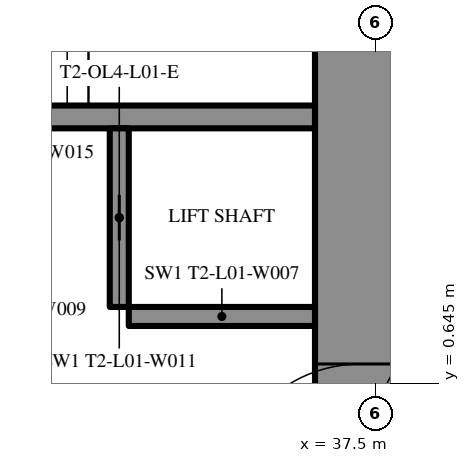
"""IFC4 building model, lengths in metres.
Left out: names, types, materials, properties, quantities, classifications, styles, units other than length and angle.
Written with IfcOpenShell. Run it as: python <this file> out.ifc"""

import sys

from ifc_helpers import new_model, si_unit, direction, frame, frame_2d, origin, place, context, subcontext, project, spatial, rectangle, extrude, element, fill, save


model = new_model("IFC4")
c1 = context("Model", 3, precision=1e-05, world=origin(), true_north=direction((0.0, 1.0)))
c2 = subcontext(c1, "Body", "Model", "MODEL_VIEW")
j1 = project(units=[si_unit("LENGTHUNIT", "METRE"), si_unit("PLANEANGLEUNIT", "RADIAN")], contexts=[c1])
p1 = place(None, origin())
s1 = spatial("IfcSite", under=j1, at=p1, CompositionType="ELEMENT")
p2 = place(p1, origin())
s2 = spatial("IfcBuilding", under=s1, at=p2, CompositionType="ELEMENT")
p3 = place(p2, frame((0.0, 0.0, 7.2)))
s3 = spatial("IfcBuildingStorey", under=s2, at=p3, CompositionType="ELEMENT", Elevation=7.2)
p4 = place(p3, frame((37.3, -8.6, 0.0), z_axis=(0.0, 0.0, 1.0), x_axis=(0.0, 1.0, 0.0)))
e1 = element("IfcWall", 1, at=p4, inside=s3, PredefinedType="SHEAR", context=c2, shape_type="SweptSolid", body=[
    extrude(rectangle(XDim=17.2, YDim=1.2, at=frame_2d((8.6, 0.0))), origin(), (0.0, 0.0, 1.0), 5.4),
])
p5 = place(p4, frame((7.7, 0.0, 0.0)))
e2 = element("IfcOpeningElement", 2, at=p5, cuts=e1, PredefinedType="OPENING", context=c2, shape_type="SweptSolid", body=[
    extrude(rectangle(XDim=1.8, YDim=2.2, at=frame_2d((0.9, 1.1))), frame((0.0, 0.61, 0.0), z_axis=(0.0, -1.0, 0.0), x_axis=(1.0, 0.0, 0.0)), (0.0, 0.0, 1.0), 1.22),
])
p6 = place(p3, frame((28.3, 4.15, 0.0), z_axis=(0.0, 0.0, 1.0), x_axis=(1.0, 0.0, 0.0)))
e3 = element("IfcWall", 3, at=p6, inside=s3, PredefinedType="SHEAR", context=c2, shape_type="SweptSolid", body=[
    extrude(rectangle(XDim=8.4, YDim=0.3, at=frame_2d((4.2, 0.0))), origin(), (0.0, 0.0, 1.0), 5.4),
])
p7 = place(p3, frame((34.125, 1.65, 0.0), z_axis=(0.0, 0.0, 1.0), x_axis=(0.0, 1.0, 0.0)))
e4 = element("IfcWall", 4, at=p7, inside=s3, PredefinedType="SHEAR", context=c2, shape_type="SweptSolid", body=[
    extrude(rectangle(XDim=2.35, YDim=0.25, at=frame_2d((1.175, 0.0))), origin(), (0.0, 0.0, 1.0), 5.4),
])
p8 = place(p7, frame((0.875, 0.0, 0.0)))
e5 = element("IfcOpeningElement", 5, at=p8, cuts=e4, PredefinedType="OPENING", context=c2, shape_type="SweptSolid", body=[
    extrude(rectangle(XDim=0.6, YDim=2.0, at=frame_2d((0.3, 1.0))), frame((0.0, 0.135, 0.0), z_axis=(0.0, -1.0, 0.0), x_axis=(1.0, 0.0, 0.0)), (0.0, 0.0, 1.0), 0.27),
])
p9 = place(p3, frame((34.25, 1.525, 0.0), z_axis=(0.0, 0.0, 1.0), x_axis=(1.0, 0.0, 0.0)))
e6 = element("IfcWall", 6, at=p9, inside=s3, PredefinedType="SHEAR", context=c2, shape_type="SweptSolid", body=[
    extrude(rectangle(XDim=2.45, YDim=0.25, at=frame_2d((1.225, 0.0))), origin(), (0.0, 0.0, 1.0), 5.4),
])
p10 = place(p3, frame((27.2, -13.8, 0.0), z_axis=(0.0, 0.0, 1.0), x_axis=(0.866027159892, 0.499996958321, 0.0)))
e7 = element("IfcWall", 7, at=p10, inside=s3, PredefinedType="SHEAR", context=c2, shape_type="SweptSolid", body=[
    extrude(rectangle(XDim=27.947, YDim=2.0, at=frame_2d((13.973, 0.0))), origin(), (0.0, 0.0, 1.0), 5.4),
])
p11 = place(p10, frame((4.6, 0.0, 0.0)))
e8 = element("IfcOpeningElement", 8, at=p11, cuts=e7, PredefinedType="OPENING", context=c2, shape_type="SweptSolid", body=[
    extrude(rectangle(XDim=1.0, YDim=2.2, at=frame_2d((0.5, 1.1))), frame((0.0, 1.01, 0.0), z_axis=(0.0, -1.0, 0.0), x_axis=(1.0, 0.0, 0.0)), (0.0, 0.0, 1.0), 2.02),
])
p12 = place(p10, frame((13.395, 0.0, 0.0)))
e9 = element("IfcOpeningElement", 9, at=p12, cuts=e7, PredefinedType="OPENING", context=c2, shape_type="SweptSolid", body=[
    extrude(rectangle(XDim=1.8, YDim=2.2, at=frame_2d((0.9, 1.1))), frame((0.0, 1.01, 0.0), z_axis=(0.0, -1.0, 0.0), x_axis=(1.0, 0.0, 0.0)), (0.0, 0.0, 1.0), 2.02),
])
p13 = place(p3, frame((27.2, 13.8, 0.0), z_axis=(0.0, 0.0, 1.0), x_axis=(0.866024545924, -0.500001485854, 0.0)))
e10 = element("IfcWall", 10, at=p13, inside=s3, PredefinedType="SHEAR", context=c2, shape_type="SweptSolid", body=[
    extrude(rectangle(XDim=26.534, YDim=2.0, at=frame_2d((13.267, 0.0))), origin(), (0.0, 0.0, 1.0), 5.4),
])
p14 = place(p13, frame((4.6, 0.0, 0.0)))
e11 = element("IfcOpeningElement", 11, at=p14, cuts=e10, PredefinedType="OPENING", context=c2, shape_type="SweptSolid", body=[
    extrude(rectangle(XDim=1.0, YDim=2.2, at=frame_2d((0.5, 1.1))), frame((0.0, 1.01, 0.0), z_axis=(0.0, -1.0, 0.0), x_axis=(1.0, 0.0, 0.0)), (0.0, 0.0, 1.0), 2.02),
])
p15 = place(p13, frame((13.395, 0.0, 0.0)))
e12 = element("IfcOpeningElement", 12, at=p15, cuts=e10, PredefinedType="OPENING", context=c2, shape_type="SweptSolid", body=[
    extrude(rectangle(XDim=1.8, YDim=2.2, at=frame_2d((0.9, 1.1))), frame((0.0, 1.01, 0.0), z_axis=(0.0, -1.0, 0.0), x_axis=(1.0, 0.0, 0.0)), (0.0, 0.0, 1.0), 2.02),
])
p16 = place(p3, frame((37.034, 11.24, 0.0), z_axis=(0.0, 0.0, 1.0), x_axis=(0.866025942536, -0.499999066854, 0.0)))
e13 = element("IfcWall", 13, at=p16, inside=s3, PredefinedType="PARTITIONING", context=c2, shape_type="SweptSolid", body=[
    extrude(rectangle(XDim=22.36, YDim=0.2, at=frame_2d((11.18, 0.0))), origin(), (0.0, 0.0, 1.0), 5.05),
])
p17 = place(p16, frame((19.423, 0.0, 0.0)))
e14 = element("IfcOpeningElement", 14, at=p17, cuts=e13, PredefinedType="OPENING", context=c2, shape_type="SweptSolid", body=[
    extrude(rectangle(XDim=1.8, YDim=2.2, at=frame_2d((0.9, 1.1))), frame((0.0, 0.11, 0.0), z_axis=(0.0, -1.0, 0.0), x_axis=(1.0, 0.0, 0.0)), (0.0, 0.0, 1.0), 0.22),
])
p18 = place(p16, frame((13.274, 0.0, 0.0)))
e15 = element("IfcOpeningElement", 15, at=p18, cuts=e13, PredefinedType="OPENING", context=c2, shape_type="SweptSolid", body=[
    extrude(rectangle(XDim=1.8, YDim=2.2, at=frame_2d((0.9, 1.1))), frame((0.0, 0.11, 0.0), z_axis=(0.0, -1.0, 0.0), x_axis=(1.0, 0.0, 0.0)), (0.0, 0.0, 1.0), 0.22),
])
p19 = place(p16, frame((4.602, 0.0, 0.0)))
e16 = element("IfcOpeningElement", 16, at=p19, cuts=e13, PredefinedType="OPENING", context=c2, shape_type="SweptSolid", body=[
    extrude(rectangle(XDim=1.8, YDim=2.2, at=frame_2d((0.9, 1.1))), frame((0.0, 0.11, 0.0), z_axis=(0.0, -1.0, 0.0), x_axis=(1.0, 0.0, 0.0)), (0.0, 0.0, 1.0), 0.22),
])
p20 = place(p5, origin())
e17 = element("IfcDoor", 17, at=p20, inside=s3, OperationType="DOUBLE_DOOR_SINGLE_SWING", PredefinedType="DOOR", context=c2, shape_type="SweptSolid", body=[
    extrude(rectangle(XDim=1.8, YDim=2.2, at=frame_2d((0.9, 1.1))), frame((0.0, 0.025, 0.0), z_axis=(0.0, -1.0, 0.0), x_axis=(1.0, 0.0, 0.0)), (0.0, 0.0, 1.0), 0.05),
])
fill(e2, e17)
p21 = place(p8, origin())
e18 = element("IfcDoor", 18, at=p21, inside=s3, OperationType="SLIDING_TO_LEFT", PredefinedType="DOOR", context=c2, shape_type="SweptSolid", body=[
    extrude(rectangle(XDim=0.6, YDim=2.0, at=frame_2d((0.3, 1.0))), frame((0.0, 0.025, 0.0), z_axis=(0.0, -1.0, 0.0), x_axis=(1.0, 0.0, 0.0)), (0.0, 0.0, 1.0), 0.05),
])
fill(e5, e18)
save(model, sys.argv[1])
